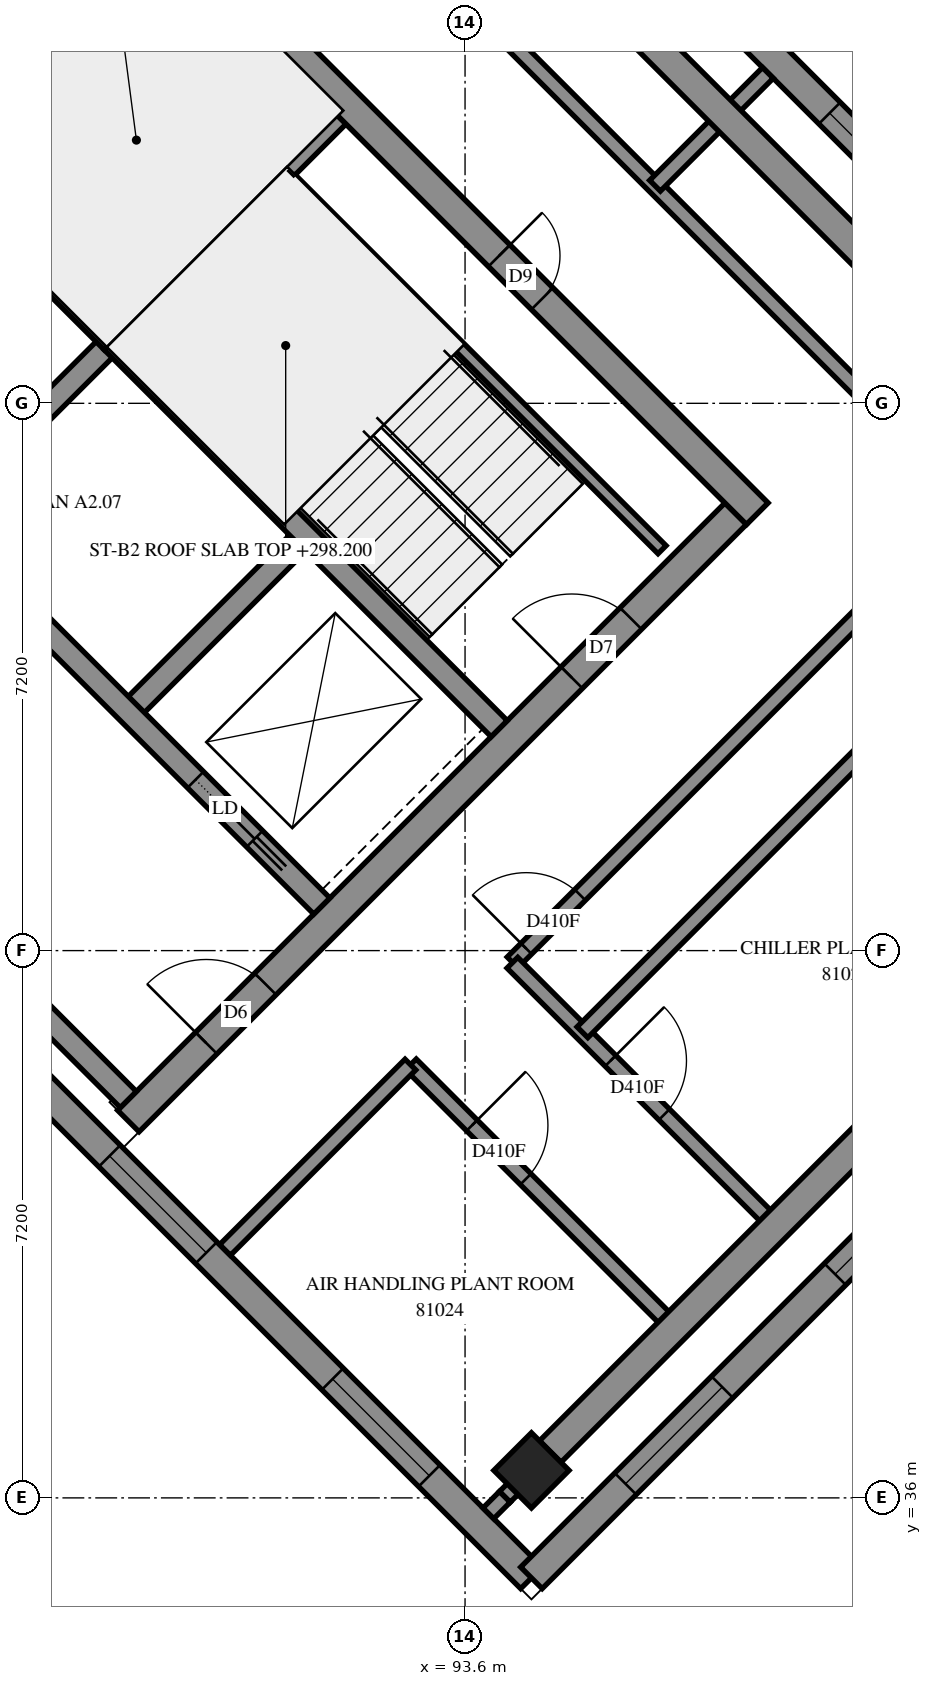
"""IFC4 building model, lengths in metres.
Left out: names, types, materials, properties, quantities, classifications, styles, units other than length and angle.
Written with IfcOpenShell. Run it as: python <this file> out.ifc"""

import sys

from ifc_helpers import new_model, si_unit, direction, frame, frame_2d, origin, origin_2d, place, context, subcontext, project, spatial, polyline, rectangle, outline, extrude, element, fill, save


model = new_model("IFC4")
c1 = context("Model", 3, precision=1e-05, world=origin(), true_north=direction((0.0, 1.0)))
c2 = subcontext(c1, "Body", "Model", "MODEL_VIEW")
j1 = project(units=[si_unit("LENGTHUNIT", "METRE"), si_unit("PLANEANGLEUNIT", "RADIAN")], contexts=[c1])
p1 = place(None, origin())
s1 = spatial("IfcSite", under=j1, at=p1, CompositionType="ELEMENT")
p2 = place(p1, origin())
s2 = spatial("IfcBuilding", under=s1, at=p2, CompositionType="ELEMENT")
p3 = place(p2, frame((0.0, 0.0, 298.2)))
s3 = spatial("IfcBuildingStorey", under=s2, at=p3, CompositionType="ELEMENT", Elevation=298.2)
p4 = place(p3, frame((94.474, 36.362, 0.0), z_axis=(0.0, 0.0, 1.0), x_axis=(0.7071067812, -0.7071067812, 0.0)))
e1 = element("IfcColumn", 1, at=p4, inside=s3, PredefinedType="COLUMN", context=c2, shape_type="SweptSolid", body=[
    extrude(rectangle(XDim=0.7, YDim=0.7, at=origin_2d()), origin(), (0.0, 0.0, 1.0), 3.5),
])
p5 = place(p3, frame((86.695, 59.696, -0.3), z_axis=(0.0, 0.0, 1.0), x_axis=(0.7071100706, -0.7071034917, 0.0)))
e2 = element("IfcWall", 2, at=p5, inside=s3, PredefinedType="SHEAR", context=c2, shape_type="SweptSolid", body=[
    extrude(outline(polyline([(0.0, 0.0), (15.2, 0.0), (15.2, 3.1), (0.0, 3.1), (0.0, 0.0)])), frame((0.0, 0.2, 0.0), z_axis=(0.0, -1.0, 0.0), x_axis=(1.0, 0.0, 0.0)), (0.0, 0.0, 1.0), 0.4),
])
p6 = place(p5, frame((10.4, 0.0, 0.3)))
e3 = element("IfcOpeningElement", 3, at=p6, cuts=e2, PredefinedType="OPENING", context=c2, shape_type="SweptSolid", body=[
    extrude(rectangle(XDim=0.8, YDim=2.1, at=frame_2d((0.4, 1.05))), frame((0.0, 0.21, 0.0), z_axis=(0.0, -1.0, 0.0), x_axis=(1.0, 0.0, 0.0)), (0.0, 0.0, 1.0), 0.42),
])
p7 = place(p3, frame((89.17, 40.958, -0.3), z_axis=(0.0, 0.0, 1.0), x_axis=(0.7071067812, 0.7071067812, 0.0)))
e4 = element("IfcWall", 4, at=p7, inside=s3, PredefinedType="SHEAR", context=c2, shape_type="SweptSolid", body=[
    extrude(outline(polyline([(0.0, 0.0), (11.3, 0.0), (11.3, 3.1), (0.0, 3.1), (0.0, 0.0)])), frame((0.0, 0.2, 0.0), z_axis=(0.0, -1.0, 0.0), x_axis=(1.0, 0.0, 0.0)), (0.0, 0.0, 1.0), 0.4),
])
p8 = place(p7, frame((1.45, 0.0, 0.3)))
e5 = element("IfcOpeningElement", 5, at=p8, cuts=e4, PredefinedType="OPENING", context=c2, shape_type="SweptSolid", body=[
    extrude(rectangle(XDim=1.1, YDim=2.1, at=frame_2d((0.55, 1.05))), frame((0.0, 0.21, 0.0), z_axis=(0.0, -1.0, 0.0), x_axis=(1.0, 0.0, 0.0)), (0.0, 0.0, 1.0), 0.42),
])
p9 = place(p7, frame((8.25, 0.0, 0.3)))
e6 = element("IfcOpeningElement", 6, at=p9, cuts=e4, PredefinedType="OPENING", context=c2, shape_type="SweptSolid", body=[
    extrude(rectangle(XDim=1.1, YDim=2.1, at=frame_2d((0.55, 1.05))), frame((0.0, 0.21, 0.0), z_axis=(0.0, -1.0, 0.0), x_axis=(1.0, 0.0, 0.0)), (0.0, 0.0, 1.0), 0.42),
])
for number, where, z_axis, x_axis in (
    (7, (86.625, 48.878, 0.0), (0.0, 0.0, 1.0), (0.707, 0.707, 0.0)),
    (8, (89.17, 46.332, 0.0), (0.0, 0.0, 1.0), (0.707, 0.707, 0.0)),
):
    element("IfcWall", number, at=place(p3, frame(where, z_axis=z_axis, x_axis=x_axis)), inside=s3, PredefinedType="SOLIDWALL", context=c2, shape_type="SweptSolid", body=[
        extrude(outline(polyline([(0.0, 0.0), (3.3, 0.0), (3.3, 3.5), (0.0, 3.5), (0.0, 0.0)])), frame((0.0, 0.15, 0.0), z_axis=(0.0, -1.0, 0.0), x_axis=(1.0, 0.0, 0.0)), (0.0, 0.0, 1.0), 0.3),
    ])
p10 = place(p3, frame((78.988, 51.423, 0.0), z_axis=(0.0, 0.0, 1.0), x_axis=(0.7071067812, -0.7071067812, 0.0)))
e9 = element("IfcWall", 9, at=p10, inside=s3, PredefinedType="SOLIDWALL", context=c2, shape_type="SweptSolid", body=[
    extrude(outline(polyline([(0.0, 0.0), (14.4, 0.0), (14.4, 3.5), (0.0, 3.5), (0.0, 0.0)])), frame((0.0, 0.15, 0.0), z_axis=(0.0, -1.0, 0.0), x_axis=(1.0, 0.0, 0.0)), (0.0, 0.0, 1.0), 0.3),
])
p11 = place(p3, frame((81.534, 53.969, 0.0), z_axis=(0.0, 0.0, 1.0), x_axis=(0.707103309, -0.7071102534, 0.0)))
e10 = element("IfcWall", 10, at=p11, inside=s3, PredefinedType="SOLIDWALL", context=c2, shape_type="SweptSolid", body=[
    extrude(outline(polyline([(0.0, 0.0), (14.4, 0.0), (14.4, 3.5), (0.0, 3.5), (0.0, 0.0)])), frame((0.0, 0.15, 0.0), z_axis=(0.0, -1.0, 0.0), x_axis=(1.0, 0.0, 0.0)), (0.0, 0.0, 1.0), 0.3),
])
p12 = place(p11, frame((12.05, 0.0, 0.0)))
e11 = element("IfcOpeningElement", 11, at=p12, cuts=e10, PredefinedType="OPENING", context=c2, shape_type="SweptSolid", body=[
    extrude(rectangle(XDim=1.1, YDim=2.1, at=frame_2d((0.55, 1.05))), frame((0.0, 0.16, 0.0), z_axis=(0.0, -1.0, 0.0), x_axis=(1.0, 0.0, 0.0)), (0.0, 0.0, 1.0), 0.32),
])
for number, where, z_axis, x_axis in (
    (12, (83.867, 56.302, 0.0), (0.0, 0.0, 1.0), (0.707, -0.707, 0.0)),
    (13, (88.958, 51.211, 0.0), (0.0, 0.0, 1.0), (0.707, -0.707, 0.0)),
):
    element("IfcWall", number, at=place(p3, frame(where, z_axis=z_axis, x_axis=x_axis)), inside=s3, PredefinedType="SOLIDWALL", context=c2, shape_type="SweptSolid", body=[
        extrude(outline(polyline([(0.0, 0.0), (7.2, 0.0), (7.2, 3.5), (0.0, 3.5), (0.0, 0.0)])), frame((0.0, 0.15, 0.0), z_axis=(0.0, -1.0, 0.0), x_axis=(1.0, 0.0, 0.0)), (0.0, 0.0, 1.0), 0.3),
    ])
p13 = place(p3, frame((88.958, 51.211, 0.0), z_axis=(0.0, 0.0, 1.0), x_axis=(0.7071067812, 0.7071067812, 0.0)))
e14 = element("IfcWall", 14, at=p13, inside=s3, PredefinedType="SOLIDWALL", context=c2, shape_type="SweptSolid", body=[
    extrude(outline(polyline([(0.0, 0.0), (4.2, 0.0), (4.2, 3.5), (0.0, 3.5), (0.0, 0.0)])), frame((0.0, 0.15, 0.0), z_axis=(0.0, -1.0, 0.0), x_axis=(1.0, 0.0, 0.0)), (0.0, 0.0, 1.0), 0.3),
])
p14 = place(p3, frame((100.48, 52.134, 0.0), z_axis=(0.0, 0.0, 1.0), x_axis=(-0.7071067812, 0.7071067812, 0.0)))
e15 = element("IfcWall", 15, at=p14, inside=s3, PredefinedType="SOLIDWALL", context=c2, shape_type="SweptSolid", body=[
    extrude(outline(polyline([(0.036, -0.2), (6.718, -0.2), (6.718, 0.2), (-0.036, 0.2), (0.036, -0.2)])), origin(), (0.0, 0.0, 1.0), 3.5),
])
p15 = place(p14, frame((1.147, 0.0, 0.7)))
e16 = element("IfcOpeningElement", 16, at=p15, cuts=e15, PredefinedType="OPENING", context=c2, shape_type="SweptSolid", body=[
    extrude(rectangle(XDim=1.8, YDim=2.2, at=frame_2d((0.9, 1.1))), frame((0.0, 0.21, 0.0), z_axis=(0.0, -1.0, 0.0), x_axis=(1.0, 0.0, 0.0)), (0.0, 0.0, 1.0), 0.42),
])
p16 = place(p14, frame((4.306, 0.0, 0.7)))
e17 = element("IfcOpeningElement", 17, at=p16, cuts=e15, PredefinedType="OPENING", context=c2, shape_type="SweptSolid", body=[
    extrude(rectangle(XDim=1.8, YDim=2.2, at=frame_2d((0.9, 1.1))), frame((0.0, 0.21, 0.0), z_axis=(0.0, -1.0, 0.0), x_axis=(1.0, 0.0, 0.0)), (0.0, 0.0, 1.0), 0.42),
])
p17 = place(p3, frame((84.291, 45.13, 0.0), z_axis=(0.0, 0.0, 1.0), x_axis=(0.7071067812, -0.7071067812, 0.0)))
e18 = element("IfcWall", 18, at=p17, inside=s3, PredefinedType="SOLIDWALL", context=c2, shape_type="SweptSolid", body=[
    extrude(outline(polyline([(-0.2, -0.2), (14.6, -0.2), (14.2, 0.2), (-0.2, 0.2), (-0.2, -0.2)])), origin(), (0.0, 0.0, 1.0), 3.5),
])
p18 = place(p17, frame((0.5, 0.0, 0.7)))
e19 = element("IfcOpeningElement", 19, at=p18, cuts=e18, PredefinedType="OPENING", context=c2, shape_type="SweptSolid", body=[
    extrude(rectangle(XDim=1.8, YDim=2.2, at=frame_2d((0.9, 1.1))), frame((0.0, 0.21, 0.0), z_axis=(0.0, -1.0, 0.0), x_axis=(1.0, 0.0, 0.0)), (0.0, 0.0, 1.0), 0.42),
])
p19 = place(p17, frame((3.5, 0.0, 0.7)))
e20 = element("IfcOpeningElement", 20, at=p19, cuts=e18, PredefinedType="OPENING", context=c2, shape_type="SweptSolid", body=[
    extrude(rectangle(XDim=1.8, YDim=2.2, at=frame_2d((0.9, 1.1))), frame((0.0, 0.21, 0.0), z_axis=(0.0, -1.0, 0.0), x_axis=(1.0, 0.0, 0.0)), (0.0, 0.0, 1.0), 0.42),
])
p20 = place(p17, frame((6.55, 0.0, 0.7)))
e21 = element("IfcOpeningElement", 21, at=p20, cuts=e18, PredefinedType="OPENING", context=c2, shape_type="SweptSolid", body=[
    extrude(rectangle(XDim=1.8, YDim=2.2, at=frame_2d((0.9, 1.1))), frame((0.0, 0.21, 0.0), z_axis=(0.0, -1.0, 0.0), x_axis=(1.0, 0.0, 0.0)), (0.0, 0.0, 1.0), 0.42),
])
p21 = place(p17, frame((10.7, 0.0, 0.7)))
e22 = element("IfcOpeningElement", 22, at=p21, cuts=e18, PredefinedType="OPENING", context=c2, shape_type="SweptSolid", body=[
    extrude(rectangle(XDim=1.8, YDim=2.2, at=frame_2d((0.9, 1.1))), frame((0.0, 0.21, 0.0), z_axis=(0.0, -1.0, 0.0), x_axis=(1.0, 0.0, 0.0)), (0.0, 0.0, 1.0), 0.42),
])
p22 = place(p3, frame((94.474, 34.948, 0.0), z_axis=(0.0, 0.0, 1.0), x_axis=(0.7071110915, 0.7071024708, 0.0)))
e23 = element("IfcWall", 23, at=p22, inside=s3, PredefinedType="SOLIDWALL", context=c2, shape_type="SweptSolid", body=[
    extrude(outline(polyline([(-0.2, -0.2), (11.8, -0.2), (11.4, 0.2), (0.2, 0.2), (-0.2, -0.2)])), origin(), (0.0, 0.0, 1.0), 3.5),
])
p23 = place(p22, frame((1.75, 0.0, 0.7)))
e24 = element("IfcOpeningElement", 24, at=p23, cuts=e23, PredefinedType="OPENING", context=c2, shape_type="SweptSolid", body=[
    extrude(rectangle(XDim=1.8, YDim=2.2, at=frame_2d((0.9, 1.1))), frame((0.0, 0.21, 0.0), z_axis=(0.0, -1.0, 0.0), x_axis=(1.0, 0.0, 0.0)), (0.0, 0.0, 1.0), 0.42),
])
p24 = place(p22, frame((5.65, 0.0, 0.7)))
e25 = element("IfcOpeningElement", 25, at=p24, cuts=e23, PredefinedType="OPENING", context=c2, shape_type="SweptSolid", body=[
    extrude(rectangle(XDim=1.8, YDim=2.2, at=frame_2d((0.9, 1.1))), frame((0.0, 0.21, 0.0), z_axis=(0.0, -1.0, 0.0), x_axis=(1.0, 0.0, 0.0)), (0.0, 0.0, 1.0), 0.42),
])
p25 = place(p22, frame((8.8, 0.0, 0.7)))
e26 = element("IfcOpeningElement", 26, at=p25, cuts=e23, PredefinedType="OPENING", context=c2, shape_type="SweptSolid", body=[
    extrude(rectangle(XDim=1.8, YDim=2.2, at=frame_2d((0.9, 1.1))), frame((0.0, 0.21, 0.0), z_axis=(0.0, -1.0, 0.0), x_axis=(1.0, 0.0, 0.0)), (0.0, 0.0, 1.0), 0.42),
])
p26 = place(p3, frame((91.313, 53.354, 0.0), z_axis=(0.0, 0.0, 1.0), x_axis=(0.7071140275, -0.7070995348, 0.0)))
e27 = element("IfcWall", 27, at=p26, inside=s3, PredefinedType="PARTITIONING", context=c2, shape_type="SweptSolid", body=[
    extrude(outline(polyline([(0.0, 0.0), (6.9, 0.0), (6.9, 3.5), (0.0, 3.5), (0.0, 0.0)])), frame((0.0, 0.075, 0.0), z_axis=(0.0, -1.0, 0.0), x_axis=(1.0, 0.0, 0.0)), (0.0, 0.0, 1.0), 0.15),
])
p27 = place(p3, frame((100.269, 49.087, 0.0), z_axis=(0.0, 0.0, 1.0), x_axis=(-0.7071525817, 0.7070609777, 0.0)))
e28 = element("IfcWall", 28, at=p27, inside=s3, PredefinedType="PARTITIONING", context=c2, shape_type="SweptSolid", body=[
    extrude(rectangle(XDim=13.1, YDim=0.2, at=frame_2d((6.55, 0.0))), origin(), (0.0, 0.0, 1.0), 3.5),
])
p28 = place(p27, frame((10.029, 0.0, 0.0)))
e29 = element("IfcOpeningElement", 29, at=p28, cuts=e28, PredefinedType="OPENING", context=c2, shape_type="SweptSolid", body=[
    extrude(rectangle(XDim=1.0, YDim=2.1, at=frame_2d((0.5, 1.05))), frame((0.0, 0.11, 0.0), z_axis=(0.0, -1.0, 0.0), x_axis=(1.0, 0.0, 0.0)), (0.0, 0.0, 1.0), 0.22),
])
p29 = place(p3, frame((94.225, 43.045, 0.0), z_axis=(0.0, 0.0, 1.0), x_axis=(0.7071067812, 0.7071067812, 0.0)))
e30 = element("IfcWall", 30, at=p29, inside=s3, PredefinedType="PARTITIONING", context=c2, shape_type="SweptSolid", body=[
    extrude(rectangle(XDim=8.55, YDim=0.2, at=frame_2d((4.275, 0.0))), origin(), (0.0, 0.0, 1.0), 3.5),
])
p30 = place(p29, frame((0.256, 0.0, 0.0)))
e31 = element("IfcOpeningElement", 31, at=p30, cuts=e30, PredefinedType="OPENING", context=c2, shape_type="SweptSolid", body=[
    extrude(rectangle(XDim=1.0, YDim=2.1, at=frame_2d((0.5, 1.05))), frame((0.0, 0.11, 0.0), z_axis=(0.0, -1.0, 0.0), x_axis=(1.0, 0.0, 0.0)), (0.0, 0.0, 1.0), 0.22),
])
p31 = place(p3, frame((92.887, 41.703, 0.0), z_axis=(0.0, 0.0, 1.0), x_axis=(0.7071067812, -0.7071067812, 0.0)))
e32 = element("IfcWall", 32, at=p31, inside=s3, PredefinedType="PARTITIONING", context=c2, shape_type="SweptSolid", body=[
    extrude(rectangle(XDim=4.899, YDim=0.2, at=frame_2d((2.449, 0.0))), origin(), (0.0, 0.0, 1.0), 3.5),
])
p32 = place(p31, frame((1.136, 0.0, 0.0)))
e33 = element("IfcOpeningElement", 33, at=p32, cuts=e32, PredefinedType="OPENING", context=c2, shape_type="SweptSolid", body=[
    extrude(rectangle(XDim=1.0, YDim=2.1, at=frame_2d((0.5, 1.05))), frame((0.0, 0.11, 0.0), z_axis=(0.0, -1.0, 0.0), x_axis=(1.0, 0.0, 0.0)), (0.0, 0.0, 1.0), 0.22),
])
p33 = place(p3, frame((94.223, 43.041, 0.0), z_axis=(0.0, 0.0, 1.0), x_axis=(0.7071067812, -0.7071067812, 0.0)))
e34 = element("IfcWall", 34, at=p33, inside=s3, PredefinedType="PARTITIONING", context=c2, shape_type="SweptSolid", body=[
    extrude(rectangle(XDim=4.899, YDim=0.2, at=frame_2d((2.449, 0.0))), origin(), (0.0, 0.0, 1.0), 3.5),
])
p34 = place(p33, frame((1.825, 0.0, 0.0)))
e35 = element("IfcOpeningElement", 35, at=p34, cuts=e34, PredefinedType="OPENING", context=c2, shape_type="SweptSolid", body=[
    extrude(rectangle(XDim=1.0, YDim=2.1, at=frame_2d((0.5, 1.05))), frame((0.0, 0.11, 0.0), z_axis=(0.0, -1.0, 0.0), x_axis=(1.0, 0.0, 0.0)), (0.0, 0.0, 1.0), 0.22),
])
p35 = place(p3, frame((90.442, 39.262, 0.0), z_axis=(0.0, 0.0, 1.0), x_axis=(0.7071067812, 0.7071067812, 0.0)))
e36 = element("IfcWall", 36, at=p35, inside=s3, PredefinedType="PARTITIONING", context=c2, shape_type="SweptSolid", body=[
    extrude(rectangle(XDim=3.449, YDim=0.2, at=frame_2d((1.725, 0.0))), origin(), (0.0, 0.0, 1.0), 3.5),
])
for number, where, z_axis, x_axis in (
    (37, (94.123, 36.013, 0.0), (0.0, 0.0, 1.0), (0.707, 0.707, 0.0)),
    (38, (97.69, 39.58, 0.0), (0.0, 0.0, 1.0), (0.707, 0.707, 0.0)),
):
    element("IfcWall", number, at=place(p3, frame(where, z_axis=z_axis, x_axis=x_axis)), inside=s3, PredefinedType="PARTITIONING", context=c2, shape_type="SweptSolid", body=[
        extrude(rectangle(XDim=3.145, YDim=0.2, at=frame_2d((1.573, 0.0))), origin(), (0.0, 0.0, 1.0), 3.0),
    ])
p36 = place(p3, frame((96.346, 38.238, 0.0), z_axis=(0.0, 0.0, 1.0), x_axis=(0.7065800724, 0.7076330979, 0.0)))
e39 = element("IfcWall", 39, at=p36, inside=s3, PredefinedType="PARTITIONING", context=c2, shape_type="SweptSolid", body=[
    extrude(rectangle(XDim=1.899, YDim=0.2, at=frame_2d((0.95, 0.0))), origin(), (0.0, 0.0, 1.0), 3.0),
])
p37 = place(p3, frame((95.144, 42.126, 0.0), z_axis=(0.0, 0.0, 1.0), x_axis=(0.7071067812, 0.7071067812, 0.0)))
e40 = element("IfcWall", 40, at=p37, inside=s3, PredefinedType="PARTITIONING", context=c2, shape_type="SweptSolid", body=[
    extrude(outline(polyline([(0.0, -0.1), (5.85, -0.1), (5.85, 0.1), (0.0, 0.1), (0.0, -0.1)])), origin(), (0.0, 0.0, 1.0), 3.5),
])
p38 = place(p3, frame((96.099, 53.263, 0.0), z_axis=(0.0, 0.0, 1.0), x_axis=(0.7071067812, 0.7071067812, 0.0)))
e41 = element("IfcWall", 41, at=p38, inside=s3, PredefinedType="PARTITIONING", context=c2, shape_type="SweptSolid", body=[
    extrude(outline(polyline([(0.0, -0.1), (2.1, -0.1), (2.1, 0.1), (0.0, 0.1), (0.0, -0.1)])), origin(), (0.0, 0.0, 1.0), 3.5),
])
p39 = place(p3, frame((93.907, 35.797, 0.0), z_axis=(0.0, 0.0, 1.0), x_axis=(0.7071067812, 0.7071067812, 0.0)))
e42 = element("IfcWall", 42, at=p39, inside=s3, PredefinedType="PARTITIONING", context=c2, shape_type="SweptSolid", body=[
    extrude(outline(polyline([(0.0, -0.1), (0.305, -0.1), (0.305, 0.1), (0.0, 0.1), (0.0, -0.1)])), origin(), (0.0, 0.0, 1.0), 3.5),
])
p40 = place(p15, origin())
e43 = element("IfcWindow", 43, at=p40, inside=s3, PartitioningType="SINGLE_PANEL", PredefinedType="WINDOW", context=c2, shape_type="SweptSolid", body=[
    extrude(rectangle(XDim=1.8, YDim=2.2, at=frame_2d((0.9, 1.1))), frame((0.0, 0.08, 0.0), z_axis=(0.0, -1.0, 0.0), x_axis=(1.0, 0.0, 0.0)), (0.0, 0.0, 1.0), 0.06),
])
fill(e16, e43)
p41 = place(p20, origin())
e44 = element("IfcWindow", 44, at=p41, inside=s3, PartitioningType="SINGLE_PANEL", PredefinedType="WINDOW", context=c2, shape_type="SweptSolid", body=[
    extrude(rectangle(XDim=1.8, YDim=2.2, at=frame_2d((0.9, 1.1))), frame((0.0, 0.08, 0.0), z_axis=(0.0, -1.0, 0.0), x_axis=(1.0, 0.0, 0.0)), (0.0, 0.0, 1.0), 0.06),
])
fill(e21, e44)
p42 = place(p21, origin())
e45 = element("IfcWindow", 45, at=p42, inside=s3, PartitioningType="SINGLE_PANEL", PredefinedType="WINDOW", context=c2, shape_type="SweptSolid", body=[
    extrude(rectangle(XDim=1.8, YDim=2.2, at=frame_2d((0.9, 1.1))), frame((0.0, 0.08, 0.0), z_axis=(0.0, -1.0, 0.0), x_axis=(1.0, 0.0, 0.0)), (0.0, 0.0, 1.0), 0.06),
])
fill(e22, e45)
p43 = place(p23, origin())
e46 = element("IfcWindow", 46, at=p43, inside=s3, PartitioningType="SINGLE_PANEL", PredefinedType="WINDOW", context=c2, shape_type="SweptSolid", body=[
    extrude(rectangle(XDim=1.8, YDim=2.2, at=frame_2d((0.9, 1.1))), frame((0.0, 0.08, 0.0), z_axis=(0.0, -1.0, 0.0), x_axis=(1.0, 0.0, 0.0)), (0.0, 0.0, 1.0), 0.06),
])
fill(e24, e46)
p44 = place(p24, origin())
e47 = element("IfcWindow", 47, at=p44, inside=s3, PartitioningType="SINGLE_PANEL", PredefinedType="WINDOW", context=c2, shape_type="SweptSolid", body=[
    extrude(rectangle(XDim=1.8, YDim=2.2, at=frame_2d((0.9, 1.1))), frame((0.0, 0.08, 0.0), z_axis=(0.0, -1.0, 0.0), x_axis=(1.0, 0.0, 0.0)), (0.0, 0.0, 1.0), 0.06),
])
fill(e25, e47)
p45 = place(p6, origin())
e48 = element("IfcDoor", 48, at=p45, inside=s3, OperationType="SINGLE_SWING_RIGHT", PredefinedType="DOOR", context=c2, shape_type="SweptSolid", body=[
    extrude(rectangle(XDim=0.8, YDim=2.1, at=frame_2d((0.4, 1.05))), frame((0.0, 0.025, 0.0), z_axis=(0.0, -1.0, 0.0), x_axis=(1.0, 0.0, 0.0)), (0.0, 0.0, 1.0), 0.05),
])
fill(e3, e48)
p46 = place(p8, origin())
e49 = element("IfcDoor", 49, at=p46, inside=s3, OperationType="DOUBLE_DOOR_SINGLE_SWING", PredefinedType="DOOR", context=c2, shape_type="SweptSolid", body=[
    extrude(rectangle(XDim=1.1, YDim=2.1, at=frame_2d((0.55, 1.05))), frame((0.0, 0.025, 0.0), z_axis=(0.0, -1.0, 0.0), x_axis=(1.0, 0.0, 0.0)), (0.0, 0.0, 1.0), 0.05),
])
fill(e5, e49)
p47 = place(p9, origin())
e50 = element("IfcDoor", 50, at=p47, inside=s3, OperationType="SINGLE_SWING_RIGHT", PredefinedType="DOOR", context=c2, shape_type="SweptSolid", body=[
    extrude(rectangle(XDim=1.1, YDim=2.1, at=frame_2d((0.55, 1.05))), frame((0.0, 0.025, 0.0), z_axis=(0.0, -1.0, 0.0), x_axis=(1.0, 0.0, 0.0)), (0.0, 0.0, 1.0), 0.05),
])
fill(e6, e50)
p48 = place(p12, origin())
e51 = element("IfcDoor", 51, at=p48, inside=s3, OperationType="SLIDING_TO_RIGHT", PredefinedType="DOOR", context=c2, shape_type="SweptSolid", body=[
    extrude(rectangle(XDim=1.1, YDim=2.1, at=frame_2d((0.55, 1.05))), frame((0.0, 0.025, 0.0), z_axis=(0.0, -1.0, 0.0), x_axis=(1.0, 0.0, 0.0)), (0.0, 0.0, 1.0), 0.05),
])
fill(e11, e51)
p49 = place(p30, origin())
e52 = element("IfcDoor", 52, at=p49, inside=s3, OperationType="SINGLE_SWING_RIGHT", PredefinedType="DOOR", context=c2, shape_type="SweptSolid", body=[
    extrude(rectangle(XDim=1.0, YDim=2.1, at=frame_2d((0.5, 1.05))), frame((0.0, 0.025, 0.0), z_axis=(0.0, -1.0, 0.0), x_axis=(1.0, 0.0, 0.0)), (0.0, 0.0, 1.0), 0.05),
])
fill(e31, e52)
p50 = place(p34, origin())
e53 = element("IfcDoor", 53, at=p50, inside=s3, OperationType="SINGLE_SWING_RIGHT", PredefinedType="DOOR", context=c2, shape_type="SweptSolid", body=[
    extrude(rectangle(XDim=1.0, YDim=2.1, at=frame_2d((0.5, 1.05))), frame((0.0, 0.025, 0.0), z_axis=(0.0, -1.0, 0.0), x_axis=(1.0, 0.0, 0.0)), (0.0, 0.0, 1.0), 0.05),
])
fill(e35, e53)
p51 = place(p32, origin())
e54 = element("IfcDoor", 54, at=p51, inside=s3, OperationType="SINGLE_SWING_LEFT", PredefinedType="DOOR", context=c2, shape_type="SweptSolid", body=[
    extrude(rectangle(XDim=1.0, YDim=2.1, at=frame_2d((0.5, 1.05))), frame((0.0, 0.025, 0.0), z_axis=(0.0, -1.0, 0.0), x_axis=(1.0, 0.0, 0.0)), (0.0, 0.0, 1.0), 0.05),
])
fill(e33, e54)
save(model, sys.argv[1])
